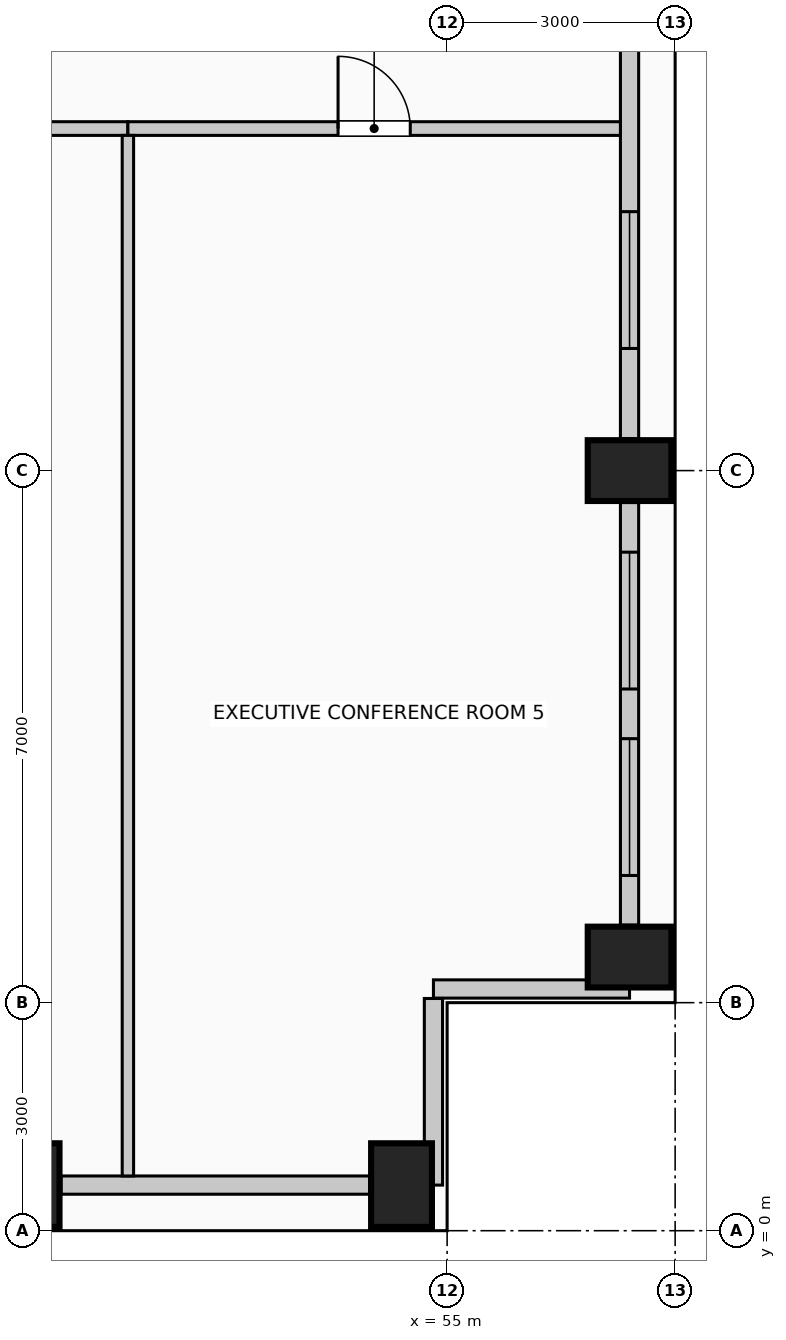
"""IFC4 building model, lengths in metres.
Left out: names, types, materials, properties, quantities, classifications, styles, units other than length and angle.
Written with IfcOpenShell. Run it as: python <this file> out.ifc"""

import sys

from ifc_helpers import new_model, si_unit, direction, frame, frame_2d, origin, origin_2d, place, context, subcontext, project, spatial, rectangle, extrude, element, fill, save


model = new_model("IFC4")
c1 = context("Model", 3, precision=1e-05, world=origin(), true_north=direction((0.0, 1.0)))
c2 = subcontext(c1, "Body", "Model", "MODEL_VIEW")
j1 = project(units=[si_unit("LENGTHUNIT", "METRE"), si_unit("PLANEANGLEUNIT", "RADIAN")], contexts=[c1])
p1 = place(None, origin())
s1 = spatial("IfcSite", under=j1, at=p1, CompositionType="ELEMENT")
p2 = place(p1, origin())
s2 = spatial("IfcBuilding", under=s1, at=p2, CompositionType="ELEMENT")
p3 = place(p2, frame((0.0, 0.0, 214.6)))
s3 = spatial("IfcBuildingStorey", under=s2, at=p3, CompositionType="ELEMENT", Elevation=214.6)
for number, where, z_axis, x_axis in (
    (1, (49.5, 0.6, 0.0), (0.0, 0.0, 1.0), (1.0, 0.0, 0.0)),
    (2, (54.4, 0.6, 0.0), (0.0, 0.0, 1.0), (1.0, 0.0, 0.0)),
    (3, (57.4, 3.6, 0.0), (0.0, 0.0, 1.0), (0.0, 1.0, 0.0)),
    (4, (57.4, 10.0, 0.0), (0.0, 0.0, 1.0), (0.0, 1.0, 0.0)),
):
    element("IfcColumn", number, at=place(p3, frame(where, z_axis=z_axis, x_axis=x_axis)), inside=s3, PredefinedType="COLUMN", context=c2, shape_type="SweptSolid", body=[
        extrude(rectangle(XDim=0.8, YDim=1.1, at=origin_2d()), origin(), (0.0, 0.0, 1.0), 4.0),
    ])
p4 = place(p3, frame((53.98, 0.6, 0.0), z_axis=(0.0, 0.0, 1.0), x_axis=(-1.0, 0.0, 0.0)))
e5 = element("IfcWall", 5, at=p4, inside=s3, PredefinedType="SOLIDWALL", context=c2, shape_type="SweptSolid", body=[
    extrude(rectangle(XDim=4.06, YDim=0.24, at=frame_2d((2.03, 0.0))), origin(), (0.0, 0.0, 1.0), 3.0),
])
p5 = place(p3, frame((57.4, 9.58, 0.0), z_axis=(0.0, 0.0, 1.0), x_axis=(0.0, -1.0, 0.0)))
e6 = element("IfcWall", 6, at=p5, inside=s3, PredefinedType="SOLIDWALL", context=c2, shape_type="SweptSolid", body=[
    extrude(rectangle(XDim=5.56, YDim=0.24, at=frame_2d((2.78, 0.0))), origin(), (0.0, 0.0, 1.0), 3.0),
])
p6 = place(p5, frame((0.653, 0.0, 0.42)))
e7 = element("IfcOpeningElement", 7, at=p6, cuts=e6, PredefinedType="OPENING", context=c2, shape_type="SweptSolid", body=[
    extrude(rectangle(XDim=1.8, YDim=2.2, at=frame_2d((0.9, 1.1))), frame((0.0, 0.13, 0.0), z_axis=(0.0, -1.0, 0.0), x_axis=(1.0, 0.0, 0.0)), (0.0, 0.0, 1.0), 0.26),
])
p7 = place(p5, frame((3.107, 0.0, 0.42)))
e8 = element("IfcOpeningElement", 8, at=p7, cuts=e6, PredefinedType="OPENING", context=c2, shape_type="SweptSolid", body=[
    extrude(rectangle(XDim=1.8, YDim=2.2, at=frame_2d((0.9, 1.1))), frame((0.0, 0.13, 0.0), z_axis=(0.0, -1.0, 0.0), x_axis=(1.0, 0.0, 0.0)), (0.0, 0.0, 1.0), 0.26),
])
p8 = place(p3, frame((57.4, 17.58, 0.0), z_axis=(0.0, 0.0, 1.0), x_axis=(0.0, -1.0, 0.0)))
e9 = element("IfcWall", 9, at=p8, inside=s3, PredefinedType="SOLIDWALL", context=c2, shape_type="SweptSolid", body=[
    extrude(rectangle(XDim=7.16, YDim=0.24, at=frame_2d((3.58, 0.0))), origin(), (0.0, 0.0, 1.0), 3.0),
])
p9 = place(p8, frame((4.173, 0.0, 0.42)))
e10 = element("IfcOpeningElement", 10, at=p9, cuts=e9, PredefinedType="OPENING", context=c2, shape_type="SweptSolid", body=[
    extrude(rectangle(XDim=1.8, YDim=2.2, at=frame_2d((0.9, 1.1))), frame((0.0, 0.13, 0.0), z_axis=(0.0, -1.0, 0.0), x_axis=(1.0, 0.0, 0.0)), (0.0, 0.0, 1.0), 0.26),
])
p10 = place(p3, frame((57.4, 3.18, 0.0), z_axis=(0.0, 0.0, 1.0), x_axis=(-1.0, 0.0, 0.0)))
e11 = element("IfcWall", 11, at=p10, inside=s3, PredefinedType="SOLIDWALL", context=c2, shape_type="SweptSolid", body=[
    extrude(rectangle(XDim=2.58, YDim=0.24, at=frame_2d((1.29, 0.0))), origin(), (0.0, 0.0, 1.0), 3.75),
])
p11 = place(p3, frame((54.82, 3.055, 0.0), z_axis=(0.0, 0.0, 1.0), x_axis=(0.0, -1.0, 0.0)))
e12 = element("IfcWall", 12, at=p11, inside=s3, PredefinedType="SOLIDWALL", context=c2, shape_type="SweptSolid", body=[
    extrude(rectangle(XDim=2.455, YDim=0.24, at=frame_2d((1.228, 0.0))), origin(), (0.0, 0.0, 1.0), 3.75),
])
p12 = place(p3, frame((39.0, 14.5, 0.0), z_axis=(0.0, 0.0, 1.0), x_axis=(1.0, 0.0, 0.0)))
e13 = element("IfcWall", 13, at=p12, inside=s3, PredefinedType="PARTITIONING", context=c2, shape_type="SweptSolid", body=[
    extrude(rectangle(XDim=11.8, YDim=0.18, at=frame_2d((5.9, 0.0))), origin(), (0.0, 0.0, 1.0), 3.75),
])
p13 = place(p12, frame((5.46, 0.0, 0.0)))
e14 = element("IfcOpeningElement", 14, at=p13, cuts=e13, PredefinedType="OPENING", context=c2, shape_type="SweptSolid", body=[
    extrude(rectangle(XDim=0.88, YDim=2.1, at=frame_2d((0.44, 1.05))), frame((0.0, 0.1, 0.0), z_axis=(0.0, -1.0, 0.0), x_axis=(1.0, 0.0, 0.0)), (0.0, 0.0, 1.0), 0.2),
])
p14 = place(p3, frame((50.8, 14.5, 0.0), z_axis=(0.0, 0.0, 1.0), x_axis=(1.0, 0.0, 0.0)))
e15 = element("IfcWall", 15, at=p14, inside=s3, PredefinedType="PARTITIONING", context=c2, shape_type="SweptSolid", body=[
    extrude(rectangle(XDim=6.48, YDim=0.18, at=frame_2d((3.24, 0.0))), origin(), (0.0, 0.0, 1.0), 3.75),
])
p15 = place(p14, frame((2.765, 0.0, 0.0)))
e16 = element("IfcOpeningElement", 16, at=p15, cuts=e15, PredefinedType="OPENING", context=c2, shape_type="SweptSolid", body=[
    extrude(rectangle(XDim=0.95, YDim=2.15, at=frame_2d((0.475, 1.075))), frame((0.0, 0.1, 0.0), z_axis=(0.0, -1.0, 0.0), x_axis=(1.0, 0.0, 0.0)), (0.0, 0.0, 1.0), 0.2),
])
p16 = place(p3, frame((50.8, 0.72, 0.0), z_axis=(0.0, 0.0, 1.0), x_axis=(0.0, 1.0, 0.0)))
e17 = element("IfcWall", 17, at=p16, inside=s3, PredefinedType="PARTITIONING", context=c2, shape_type="SweptSolid", body=[
    extrude(rectangle(XDim=13.69, YDim=0.15, at=frame_2d((6.845, 0.0))), origin(), (0.0, 0.0, 1.0), 3.75),
])
p17 = place(p6, origin())
e18 = element("IfcWindow", 18, at=p17, inside=s3, PartitioningType="SINGLE_PANEL", PredefinedType="WINDOW", context=c2, shape_type="SweptSolid", body=[
    extrude(rectangle(XDim=1.8, YDim=2.2, at=frame_2d((0.9, 1.1))), frame((0.0, 0.03, 0.0), z_axis=(0.0, -1.0, 0.0), x_axis=(1.0, 0.0, 0.0)), (0.0, 0.0, 1.0), 0.06),
])
fill(e7, e18)
p18 = place(p7, origin())
e19 = element("IfcWindow", 19, at=p18, inside=s3, PartitioningType="SINGLE_PANEL", PredefinedType="WINDOW", context=c2, shape_type="SweptSolid", body=[
    extrude(rectangle(XDim=1.8, YDim=2.2, at=frame_2d((0.9, 1.1))), frame((0.0, 0.03, 0.0), z_axis=(0.0, -1.0, 0.0), x_axis=(1.0, 0.0, 0.0)), (0.0, 0.0, 1.0), 0.06),
])
fill(e8, e19)
p19 = place(p9, origin())
e20 = element("IfcWindow", 20, at=p19, inside=s3, PartitioningType="SINGLE_PANEL", PredefinedType="WINDOW", context=c2, shape_type="SweptSolid", body=[
    extrude(rectangle(XDim=1.8, YDim=2.2, at=frame_2d((0.9, 1.1))), frame((0.0, 0.03, 0.0), z_axis=(0.0, -1.0, 0.0), x_axis=(1.0, 0.0, 0.0)), (0.0, 0.0, 1.0), 0.06),
])
fill(e10, e20)
p20 = place(p15, origin())
e21 = element("IfcDoor", 21, at=p20, inside=s3, OperationType="SINGLE_SWING_LEFT", PredefinedType="DOOR", context=c2, shape_type="SweptSolid", body=[
    extrude(rectangle(XDim=0.95, YDim=2.15, at=frame_2d((0.475, 1.075))), frame((0.0, 0.025, 0.0), z_axis=(0.0, -1.0, 0.0), x_axis=(1.0, 0.0, 0.0)), (0.0, 0.0, 1.0), 0.05),
])
fill(e16, e21)
save(model, sys.argv[1])
